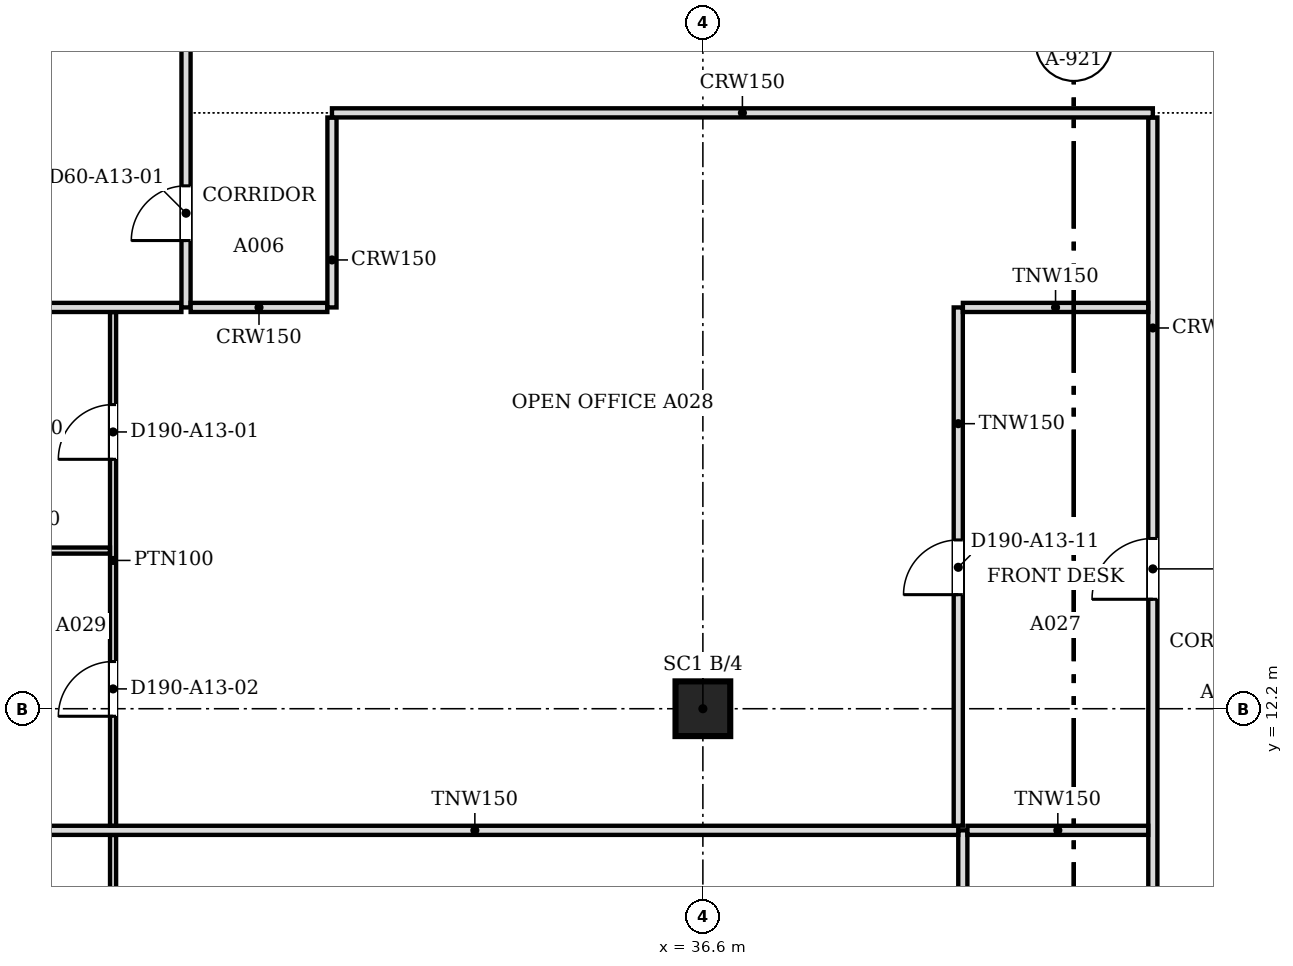
"""IFC4 building model, lengths in metres.
Left out: names, types, materials, properties, quantities, classifications, styles, units other than length and angle.
Written with IfcOpenShell. Run it as: python <this file> out.ifc"""

import sys

from ifc_helpers import new_model, si_unit, direction, frame, frame_2d, origin, origin_2d, place, context, subcontext, project, spatial, rectangle, extrude, source, transform, mapped, element, fill, save


model = new_model("IFC4")
c1 = context("Model", 3, precision=1e-05, world=origin(), true_north=direction((0.0, 1.0)))
c2 = subcontext(c1, "Body", "Model", "MODEL_VIEW")
j1 = project(units=[si_unit("LENGTHUNIT", "METRE"), si_unit("PLANEANGLEUNIT", "RADIAN")], contexts=[c1])
p1 = place(None, origin())
s1 = spatial("IfcSite", under=j1, at=p1, CompositionType="ELEMENT")
p2 = place(p1, origin())
s2 = spatial("IfcBuilding", under=s1, at=p2, CompositionType="ELEMENT")
p3 = place(p2, frame((0.0, 0.0, 146.8)))
s3 = spatial("IfcBuildingStorey", under=s2, at=p3, CompositionType="ELEMENT", Elevation=146.8)
p4 = place(p3, frame((36.6, 12.2, 0.0), z_axis=(0.0, 0.0, 1.0), x_axis=(1.0, 0.0, 0.0)))
e1 = element("IfcColumn", 1, at=p4, inside=s3, PredefinedType="COLUMN", context=c2, shape_type="SweptSolid", body=[
    extrude(rectangle(XDim=0.9, YDim=0.9, at=origin_2d()), origin(), (0.0, 0.0, 1.0), 3.5),
])
p5 = place(p3, frame((44.0, 0.5, 0.0), z_axis=(0.0, 0.0, 1.0), x_axis=(0.0, 1.0, 0.0)))
e2 = element("IfcWall", 2, at=p5, inside=s3, PredefinedType="PARTITIONING", context=c2, shape_type="SweptSolid", body=[
    extrude(rectangle(XDim=21.424, YDim=0.15, at=frame_2d((10.712, 0.0))), origin(), (0.0, 0.0, 1.0), 2.888),
])
m1 = source(origin(), c2, "Body", "SweptSolid", [
    extrude(rectangle(XDim=1.0, YDim=2.1, at=frame_2d((0.5, 1.05))), frame((0.0, 0.085, 0.0), z_axis=(0.0, -1.0, 0.0), x_axis=(1.0, 0.0, 0.0)), (0.0, 0.0, 1.0), 0.17),
])
p6 = place(p5, frame((6.2, 0.0, 0.0)))
e3 = element("IfcOpeningElement", 3, at=p6, cuts=e2, PredefinedType="OPENING", context=c2, shape_type="MappedRepresentation", body=[
    mapped(m1, transform((0.0, 0.0, 0.0), scale=1.0)),
])
p7 = place(p5, frame((13.5, 0.0, 0.0)))
e4 = element("IfcOpeningElement", 4, at=p7, cuts=e2, PredefinedType="OPENING", context=c2, shape_type="MappedRepresentation", body=[
    mapped(m1, transform((0.0, 0.0, 0.0), scale=1.0)),
])
p8 = place(p3, frame((26.9, 4.2, 0.0), z_axis=(0.0, 0.0, 1.0), x_axis=(0.0, 1.0, 0.0)))
e5 = element("IfcWall", 5, at=p8, inside=s3, PredefinedType="PARTITIONING", context=c2, shape_type="SweptSolid", body=[
    extrude(rectangle(XDim=5.924, YDim=0.1, at=frame_2d((2.962, 0.0))), origin(), (0.0, 0.0, 1.0), 2.888),
])
m2 = source(origin(), c2, "Body", "SweptSolid", [
    extrude(rectangle(XDim=0.9, YDim=2.1, at=frame_2d((0.45, 1.05))), frame((0.0, 0.06, 0.0), z_axis=(0.0, -1.0, 0.0), x_axis=(1.0, 0.0, 0.0)), (0.0, 0.0, 1.0), 0.12),
])
p9 = place(p8, frame((2.5, 0.0, 0.0)))
e6 = element("IfcOpeningElement", 6, at=p9, cuts=e5, PredefinedType="OPENING", context=c2, shape_type="MappedRepresentation", body=[
    mapped(m2, transform((0.0, 0.0, 0.0), scale=1.0)),
])
p10 = place(p3, frame((40.875, 4.2, 0.0), z_axis=(0.0, 0.0, 1.0), x_axis=(0.0, 1.0, 0.0)))
e7 = element("IfcWall", 7, at=p10, inside=s3, PredefinedType="PARTITIONING", context=c2, shape_type="SweptSolid", body=[
    extrude(rectangle(XDim=6.0, YDim=0.15, at=frame_2d((3.0, 0.0))), origin(), (0.0, 0.0, 1.0), 2.888),
])
p11 = place(p3, frame((24.9, 10.2, 0.0), z_axis=(0.0, 0.0, 1.0), x_axis=(1.0, 0.0, 0.0)))
e8 = element("IfcWall", 8, at=p11, inside=s3, PredefinedType="PARTITIONING", context=c2, shape_type="SweptSolid", body=[
    extrude(rectangle(XDim=15.9, YDim=0.15, at=frame_2d((7.95, 0.0))), origin(), (0.0, 0.0, 1.0), 2.888),
])
p12 = place(p3, frame((40.951, 10.2, 0.0), z_axis=(0.0, 0.0, 1.0), x_axis=(1.0, 0.0, 0.0)))
e9 = element("IfcWall", 9, at=p12, inside=s3, PredefinedType="PARTITIONING", context=c2, shape_type="SweptSolid", body=[
    extrude(rectangle(XDim=2.973, YDim=0.15, at=frame_2d((1.487, 0.0))), origin(), (0.0, 0.0, 1.0), 2.888),
])
p13 = place(p3, frame((26.9, 10.276, 0.0), z_axis=(0.0, 0.0, 1.0), x_axis=(0.0, 1.0, 0.0)))
e10 = element("IfcWall", 10, at=p13, inside=s3, PredefinedType="PARTITIONING", context=c2, shape_type="SweptSolid", body=[
    extrude(rectangle(XDim=8.448, YDim=0.1, at=frame_2d((4.224, 0.0))), origin(), (0.0, 0.0, 1.0), 2.888),
])
p14 = place(p13, frame((6.026, 0.0, 0.0)))
e11 = element("IfcOpeningElement", 11, at=p14, cuts=e10, PredefinedType="OPENING", context=c2, shape_type="MappedRepresentation", body=[
    mapped(m2, transform((0.0, 0.0, 0.0), scale=1.0)),
])
p15 = place(p13, frame((1.8, 0.0, 0.0)))
e12 = element("IfcOpeningElement", 12, at=p15, cuts=e10, PredefinedType="OPENING", context=c2, shape_type="MappedRepresentation", body=[
    mapped(m2, transform((0.0, 0.0, 0.0), scale=1.0)),
])
p16 = place(p3, frame((40.8, 10.276, 0.0), z_axis=(0.0, 0.0, 1.0), x_axis=(0.0, 1.0, 0.0)))
e13 = element("IfcWall", 13, at=p16, inside=s3, PredefinedType="PARTITIONING", context=c2, shape_type="SweptSolid", body=[
    extrude(rectangle(XDim=8.524, YDim=0.15, at=frame_2d((4.262, 0.0))), origin(), (0.0, 0.0, 1.0), 2.888),
])
m3 = source(origin(), c2, "Body", "SweptSolid", [
    extrude(rectangle(XDim=0.9, YDim=2.1, at=frame_2d((0.45, 1.05))), frame((0.0, 0.085, 0.0), z_axis=(0.0, -1.0, 0.0), x_axis=(1.0, 0.0, 0.0)), (0.0, 0.0, 1.0), 0.17),
])
p17 = place(p16, frame((3.8, 0.0, 0.0)))
e14 = element("IfcOpeningElement", 14, at=p17, cuts=e13, PredefinedType="OPENING", context=c2, shape_type="MappedRepresentation", body=[
    mapped(m3, transform((0.0, 0.0, 0.0), scale=1.0)),
])
p18 = place(p3, frame((23.933, 14.801, 0.0), z_axis=(0.0, 0.0, 1.0), x_axis=(1.0, 0.0, 0.0)))
e15 = element("IfcWall", 15, at=p18, inside=s3, PredefinedType="PARTITIONING", context=c2, shape_type="SweptSolid", body=[
    extrude(rectangle(XDim=2.917, YDim=0.1, at=frame_2d((1.458, 0.0))), origin(), (0.0, 0.0, 1.0), 2.888),
])
p19 = place(p3, frame((22.0, 18.8, 0.0), z_axis=(0.0, 0.0, 1.0), x_axis=(1.0, 0.0, 0.0)))
e16 = element("IfcWall", 16, at=p19, inside=s3, PredefinedType="PARTITIONING", context=c2, shape_type="SweptSolid", body=[
    extrude(rectangle(XDim=6.024, YDim=0.15, at=frame_2d((3.012, 0.0))), origin(), (0.0, 0.0, 1.0), 2.888),
])
p20 = place(p3, frame((28.1, 18.8, 0.0), z_axis=(0.0, 0.0, 1.0), x_axis=(0.0, 1.0, 0.0)))
e17 = element("IfcWall", 17, at=p20, inside=s3, PredefinedType="PARTITIONING", context=c2, shape_type="SweptSolid", body=[
    extrude(rectangle(XDim=26.024, YDim=0.15, at=frame_2d((13.012, 0.0))), origin(), (0.0, 0.0, 1.0), 2.888),
])
p21 = place(p20, frame((1.1, 0.0, 0.0)))
e18 = element("IfcOpeningElement", 18, at=p21, cuts=e17, PredefinedType="OPENING", context=c2, shape_type="MappedRepresentation", body=[
    mapped(m3, transform((0.0, 0.0, 0.0), scale=1.0)),
])
p22 = place(p20, frame((14.201, 0.0, 0.0)))
e19 = element("IfcOpeningElement", 19, at=p22, cuts=e17, PredefinedType="OPENING", context=c2, shape_type="MappedRepresentation", body=[
    mapped(m1, transform((0.0, 0.0, 0.0), scale=1.0)),
])
p23 = place(p20, frame((8.2, 0.0, 0.0)))
e20 = element("IfcOpeningElement", 20, at=p23, cuts=e17, PredefinedType="OPENING", context=c2, shape_type="MappedRepresentation", body=[
    mapped(m3, transform((0.0, 0.0, 0.0), scale=1.0)),
])
p24 = place(p20, frame((21.4, 0.0, 0.0)))
e21 = element("IfcOpeningElement", 21, at=p24, cuts=e17, PredefinedType="OPENING", context=c2, shape_type="MappedRepresentation", body=[
    mapped(m1, transform((0.0, 0.0, 0.0), scale=1.0)),
])
p25 = place(p3, frame((28.176, 18.8, 0.0), z_axis=(0.0, 0.0, 1.0), x_axis=(1.0, 0.0, 0.0)))
e22 = element("IfcWall", 22, at=p25, inside=s3, PredefinedType="PARTITIONING", context=c2, shape_type="SweptSolid", body=[
    extrude(rectangle(XDim=2.248, YDim=0.15, at=frame_2d((1.124, 0.0))), origin(), (0.0, 0.0, 1.0), 2.888),
])
p26 = place(p3, frame((30.5, 18.8, 0.0), z_axis=(0.0, 0.0, 1.0), x_axis=(0.0, 1.0, 0.0)))
e23 = element("IfcWall", 23, at=p26, inside=s3, PredefinedType="PARTITIONING", context=c2, shape_type="SweptSolid", body=[
    extrude(rectangle(XDim=3.124, YDim=0.15, at=frame_2d((1.562, 0.0))), origin(), (0.0, 0.0, 1.0), 2.888),
])
p27 = place(p3, frame((40.876, 18.8, 0.0), z_axis=(0.0, 0.0, 1.0), x_axis=(1.0, 0.0, 0.0)))
e24 = element("IfcWall", 24, at=p27, inside=s3, PredefinedType="PARTITIONING", context=c2, shape_type="SweptSolid", body=[
    extrude(rectangle(XDim=3.048, YDim=0.15, at=frame_2d((1.524, 0.0))), origin(), (0.0, 0.0, 1.0), 2.888),
])
p28 = place(p3, frame((30.5, 22.0, 0.0), z_axis=(0.0, 0.0, 1.0), x_axis=(1.0, 0.0, 0.0)))
e25 = element("IfcWall", 25, at=p28, inside=s3, PredefinedType="PARTITIONING", context=c2, shape_type="SweptSolid", body=[
    extrude(rectangle(XDim=13.5, YDim=0.15, at=frame_2d((6.75, 0.0))), origin(), (0.0, 0.0, 1.0), 2.888),
])
m4 = source(origin(), c2, "Body", "SweptSolid", [
    extrude(rectangle(XDim=0.9, YDim=2.1, at=frame_2d((0.45, 1.05))), frame((0.0, 0.025, 0.0), z_axis=(0.0, -1.0, 0.0), x_axis=(1.0, 0.0, 0.0)), (0.0, 0.0, 1.0), 0.05),
])
p29 = place(p21, origin())
e26 = element("IfcDoor", 26, at=p29, inside=s3, OperationType="SINGLE_SWING_LEFT", PredefinedType="DOOR", context=c2, shape_type="MappedRepresentation", body=[
    mapped(m4, transform((0.0, 0.0, 0.0), scale=1.0)),
])
fill(e18, e26)
p30 = place(p14, origin())
e27 = element("IfcDoor", 27, at=p30, inside=s3, OperationType="SINGLE_SWING_LEFT", PredefinedType="DOOR", context=c2, shape_type="MappedRepresentation", body=[
    mapped(m4, transform((0.0, 0.0, 0.0), scale=1.0)),
])
fill(e11, e27)
p31 = place(p15, origin())
e28 = element("IfcDoor", 28, at=p31, inside=s3, OperationType="SINGLE_SWING_LEFT", PredefinedType="DOOR", context=c2, shape_type="MappedRepresentation", body=[
    mapped(m4, transform((0.0, 0.0, 0.0), scale=1.0)),
])
fill(e12, e28)
m5 = source(origin(), c2, "Body", "SweptSolid", [
    extrude(rectangle(XDim=1.0, YDim=2.1, at=frame_2d((0.5, 1.05))), frame((0.0, 0.025, 0.0), z_axis=(0.0, -1.0, 0.0), x_axis=(1.0, 0.0, 0.0)), (0.0, 0.0, 1.0), 0.05),
])
p32 = place(p7, origin())
e29 = element("IfcDoor", 29, at=p32, inside=s3, OperationType="SINGLE_SWING_LEFT", PredefinedType="DOOR", context=c2, shape_type="MappedRepresentation", body=[
    mapped(m5, transform((0.0, 0.0, 0.0), scale=1.0)),
])
fill(e4, e29)
p33 = place(p17, origin())
e30 = element("IfcDoor", 30, at=p33, inside=s3, OperationType="SINGLE_SWING_LEFT", PredefinedType="DOOR", context=c2, shape_type="MappedRepresentation", body=[
    mapped(m4, transform((0.0, 0.0, 0.0), scale=1.0)),
])
fill(e14, e30)
save(model, sys.argv[1])
